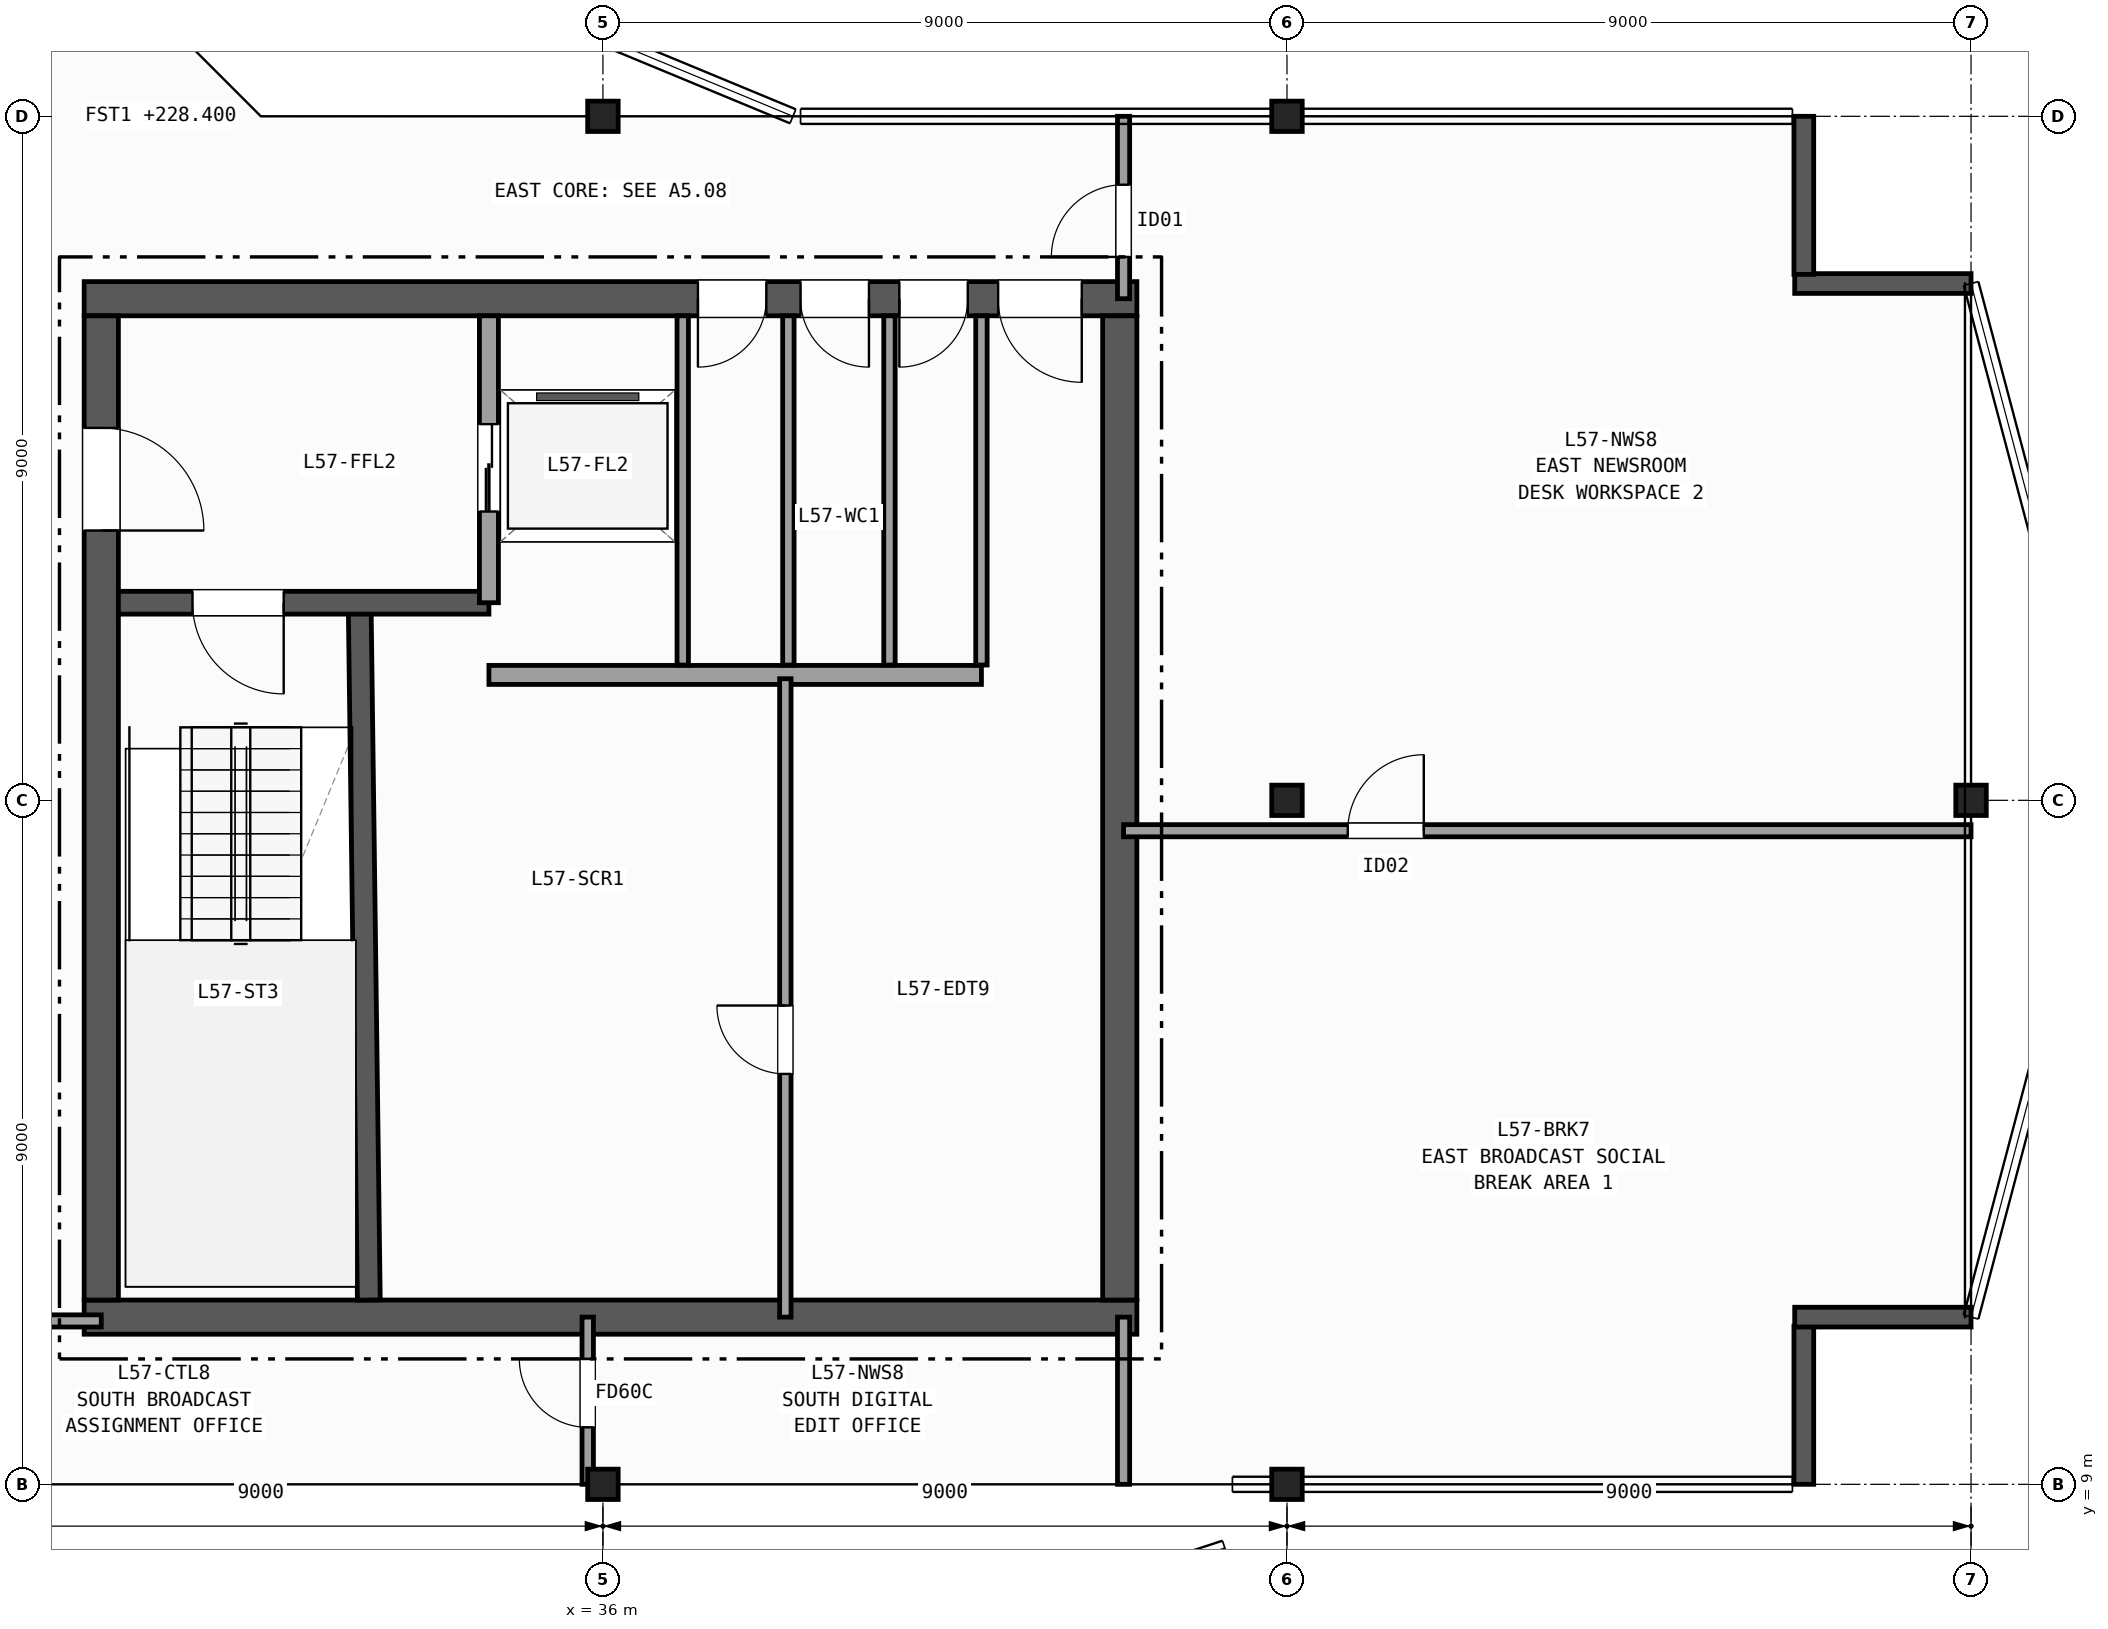
"""IFC4 building model, lengths in metres.
Left out: names, types, materials, properties, quantities, classifications, styles, units other than length and angle.
Written with IfcOpenShell. Run it as: python <this file> out.ifc"""

import sys

from ifc_helpers import new_model, si_unit, direction, frame, frame_2d, origin, origin_2d, place, context, subcontext, project, spatial, rectangle, i_section, extrude, element, fill, save


model = new_model("IFC4")
c1 = context("Model", 3, precision=1e-05, world=origin(), true_north=direction((0.0, 1.0)))
c2 = subcontext(c1, "Body", "Model", "MODEL_VIEW")
j1 = project(units=[si_unit("LENGTHUNIT", "METRE"), si_unit("PLANEANGLEUNIT", "RADIAN")], contexts=[c1])
p1 = place(None, origin())
s1 = spatial("IfcSite", under=j1, at=p1, CompositionType="ELEMENT")
p2 = place(p1, origin())
s2 = spatial("IfcBuilding", under=s1, at=p2, CompositionType="ELEMENT")
p3 = place(p2, frame((0.0, 0.0, 228.4)))
s3 = spatial("IfcBuildingStorey", under=s2, at=p3, CompositionType="ELEMENT", Elevation=228.4)
for number, where, z_axis, x_axis in (
    (1, (36.0, 9.0, 0.0), (0.0, 0.0, 1.0), (1.0, 0.0, 0.0)),
    (2, (36.0, 27.0, 0.0), (0.0, 0.0, 1.0), (1.0, 0.0, 0.0)),
    (3, (45.0, 9.0, 0.0), (0.0, 0.0, 1.0), (1.0, 0.0, 0.0)),
    (4, (45.0, 18.0, 0.0), (0.0, 0.0, 1.0), (1.0, 0.0, 0.0)),
    (5, (45.0, 27.0, 0.0), (0.0, 0.0, 1.0), (1.0, 0.0, 0.0)),
    (6, (54.0, 18.0, 0.0), (0.0, 0.0, 1.0), (1.0, 0.0, 0.0)),
):
    element("IfcColumn", number, at=place(p3, frame(where, z_axis=z_axis, x_axis=x_axis)), inside=s3, PredefinedType="COLUMN", context=c2, shape_type="SweptSolid", body=[
        extrude(i_section(OverallWidth=0.401, OverallDepth=0.399, WebThickness=0.025, FlangeThickness=0.04, FilletRadius=0.015, at=origin_2d()), origin(), (0.0, 0.0, 1.0), 3.7),
    ])
p4 = place(p3, frame((51.8, 9.0, 0.0), z_axis=(0.0, 0.0, 1.0), x_axis=(0.0, 1.0, 0.0)))
e7 = element("IfcWall", 7, at=p4, inside=s3, PredefinedType="SOLIDWALL", context=c2, shape_type="SweptSolid", body=[
    extrude(rectangle(XDim=2.08, YDim=0.26, at=frame_2d((1.04, 0.0))), origin(), (0.0, 0.0, 1.0), 3.42),
])
for number, where, z_axis, x_axis in (
    (8, (51.68, 11.2, 0.0), (0.0, 0.0, 1.0), (1.0, 0.0, 0.0)),
    (9, (54.0, 24.8, 0.0), (0.0, 0.0, 1.0), (-1.0, 0.0, 0.0)),
):
    element("IfcWall", number, at=place(p3, frame(where, z_axis=z_axis, x_axis=x_axis)), inside=s3, PredefinedType="SOLIDWALL", context=c2, shape_type="SweptSolid", body=[
        extrude(rectangle(XDim=2.32, YDim=0.26, at=frame_2d((1.16, 0.0))), origin(), (0.0, 0.0, 1.0), 3.42),
    ])
p5 = place(p3, frame((51.8, 24.92, 0.0), z_axis=(0.0, 0.0, 1.0), x_axis=(0.0, 1.0, 0.0)))
e10 = element("IfcWall", 10, at=p5, inside=s3, PredefinedType="SOLIDWALL", context=c2, shape_type="SweptSolid", body=[
    extrude(rectangle(XDim=2.08, YDim=0.26, at=frame_2d((1.04, 0.0))), origin(), (0.0, 0.0, 1.0), 3.42),
])
p6 = place(p3, frame((29.175, 11.2, 0.0), z_axis=(0.0, 0.0, 1.0), x_axis=(1.0, 0.0, 0.0)))
e11 = element("IfcWall", 11, at=p6, inside=s3, PredefinedType="SHEAR", context=c2, shape_type="SweptSolid", body=[
    extrude(rectangle(XDim=13.85, YDim=0.45, at=frame_2d((6.925, 0.0))), origin(), (0.0, 0.0, 1.0), 3.42),
])
p7 = place(p3, frame((43.025, 24.6, 0.0), z_axis=(0.0, 0.0, 1.0), x_axis=(-1.0, 0.0, 0.0)))
e12 = element("IfcWall", 12, at=p7, inside=s3, PredefinedType="SHEAR", context=c2, shape_type="SweptSolid", body=[
    extrude(rectangle(XDim=13.85, YDim=0.45, at=frame_2d((6.925, 0.0))), origin(), (0.0, 0.0, 1.0), 3.42),
])
p8 = place(p7, frame((0.725, 0.0, 0.0)))
e13 = element("IfcOpeningElement", 13, at=p8, cuts=e12, PredefinedType="OPENING", context=c2, shape_type="SweptSolid", body=[
    extrude(rectangle(XDim=1.1, YDim=2.15, at=frame_2d((0.55, 1.075))), frame((0.0, 0.235, 0.0), z_axis=(0.0, -1.0, 0.0), x_axis=(1.0, 0.0, 0.0)), (0.0, 0.0, 1.0), 0.47),
])
p9 = place(p7, frame((2.225, 0.0, 0.0)))
e14 = element("IfcOpeningElement", 14, at=p9, cuts=e12, PredefinedType="OPENING", context=c2, shape_type="SweptSolid", body=[
    extrude(rectangle(XDim=0.9, YDim=2.1, at=frame_2d((0.45, 1.05))), frame((0.0, 0.235, 0.0), z_axis=(0.0, -1.0, 0.0), x_axis=(1.0, 0.0, 0.0)), (0.0, 0.0, 1.0), 0.47),
])
p10 = place(p7, frame((3.525, 0.0, 0.0)))
e15 = element("IfcOpeningElement", 15, at=p10, cuts=e12, PredefinedType="OPENING", context=c2, shape_type="SweptSolid", body=[
    extrude(rectangle(XDim=0.9, YDim=2.1, at=frame_2d((0.45, 1.05))), frame((0.0, 0.235, 0.0), z_axis=(0.0, -1.0, 0.0), x_axis=(1.0, 0.0, 0.0)), (0.0, 0.0, 1.0), 0.47),
])
p11 = place(p7, frame((4.875, 0.0, 0.0)))
e16 = element("IfcOpeningElement", 16, at=p11, cuts=e12, PredefinedType="OPENING", context=c2, shape_type="SweptSolid", body=[
    extrude(rectangle(XDim=0.9, YDim=2.1, at=frame_2d((0.45, 1.05))), frame((0.0, 0.235, 0.0), z_axis=(0.0, -1.0, 0.0), x_axis=(1.0, 0.0, 0.0)), (0.0, 0.0, 1.0), 0.47),
])
p12 = place(p3, frame((29.4, 24.375, 0.0), z_axis=(0.0, 0.0, 1.0), x_axis=(0.0, -1.0, 0.0)))
e17 = element("IfcWall", 17, at=p12, inside=s3, PredefinedType="SHEAR", context=c2, shape_type="SweptSolid", body=[
    extrude(rectangle(XDim=12.95, YDim=0.45, at=frame_2d((6.475, 0.0))), origin(), (0.0, 0.0, 1.0), 3.42),
])
p13 = place(p12, frame((1.475, 0.0, 0.0)))
e18 = element("IfcOpeningElement", 18, at=p13, cuts=e17, PredefinedType="OPENING", context=c2, shape_type="SweptSolid", body=[
    extrude(rectangle(XDim=1.35, YDim=2.15, at=frame_2d((0.675, 1.075))), frame((0.0, 0.235, 0.0), z_axis=(0.0, -1.0, 0.0), x_axis=(1.0, 0.0, 0.0)), (0.0, 0.0, 1.0), 0.47),
])
p14 = place(p3, frame((42.8, 11.425, 0.0), z_axis=(0.0, 0.0, 1.0), x_axis=(0.0, 1.0, 0.0)))
e19 = element("IfcWall", 19, at=p14, inside=s3, PredefinedType="SHEAR", context=c2, shape_type="SweptSolid", body=[
    extrude(rectangle(XDim=12.95, YDim=0.45, at=frame_2d((6.475, 0.0))), origin(), (0.0, 0.0, 1.0), 3.42),
])
p15 = place(p3, frame((32.92, 11.425, 0.0), z_axis=(0.0, 0.0, 1.0), x_axis=(-0.013135638869, 0.999913723774, 0.0)))
e20 = element("IfcWall", 20, at=p15, inside=s3, PredefinedType="SHEAR", context=c2, shape_type="SweptSolid", body=[
    extrude(rectangle(XDim=9.126, YDim=0.3, at=frame_2d((4.563, 0.0))), origin(), (0.0, 0.0, 1.0), 3.42),
])
p16 = place(p3, frame((34.5, 20.6, 0.0), z_axis=(0.0, 0.0, 1.0), x_axis=(-1.0, 0.0, 0.0)))
e21 = element("IfcWall", 21, at=p16, inside=s3, PredefinedType="SHEAR", context=c2, shape_type="SweptSolid", body=[
    extrude(rectangle(XDim=4.875, YDim=0.3, at=frame_2d((2.438, 0.0))), origin(), (0.0, 0.0, 1.0), 3.42),
])
p17 = place(p16, frame((2.7, 0.0, 0.0)))
e22 = element("IfcOpeningElement", 22, at=p17, cuts=e21, PredefinedType="OPENING", context=c2, shape_type="SweptSolid", body=[
    extrude(rectangle(XDim=1.2, YDim=2.15, at=frame_2d((0.6, 1.075))), frame((0.0, 0.16, 0.0), z_axis=(0.0, -1.0, 0.0), x_axis=(1.0, 0.0, 0.0)), (0.0, 0.0, 1.0), 0.32),
])
p18 = place(p3, frame((34.5, 20.6, 0.0), z_axis=(0.0, 0.0, 1.0), x_axis=(0.0, 1.0, 0.0)))
e23 = element("IfcWall", 23, at=p18, inside=s3, PredefinedType="PARTITIONING", context=c2, shape_type="SweptSolid", body=[
    extrude(rectangle(XDim=3.775, YDim=0.25, at=frame_2d((1.887, 0.0))), origin(), (0.0, 0.0, 1.0), 3.42),
])
p19 = place(p18, frame((1.2, 0.0, 0.0)))
e24 = element("IfcOpeningElement", 24, at=p19, cuts=e23, PredefinedType="OPENING", context=c2, shape_type="SweptSolid", body=[
    extrude(rectangle(XDim=1.15, YDim=2.15, at=frame_2d((0.575, 1.075))), frame((0.0, 0.135, 0.0), z_axis=(0.0, -1.0, 0.0), x_axis=(1.0, 0.0, 0.0)), (0.0, 0.0, 1.0), 0.27),
])
p20 = place(p3, frame((34.5, 19.65, 0.0), z_axis=(0.0, 0.0, 1.0), x_axis=(1.0, 0.0, 0.0)))
e25 = element("IfcWall", 25, at=p20, inside=s3, PredefinedType="PARTITIONING", context=c2, shape_type="SweptSolid", body=[
    extrude(rectangle(XDim=6.48, YDim=0.25, at=frame_2d((3.24, 0.0))), origin(), (0.0, 0.0, 1.0), 3.42),
])
p21 = place(p3, frame((38.4, 11.2, 0.0), z_axis=(0.0, 0.0, 1.0), x_axis=(0.0, 1.0, 0.0)))
e26 = element("IfcWall", 26, at=p21, inside=s3, PredefinedType="PARTITIONING", context=c2, shape_type="SweptSolid", body=[
    extrude(rectangle(XDim=8.4, YDim=0.15, at=frame_2d((4.2, 0.0))), origin(), (0.0, 0.0, 1.0), 3.42),
])
p22 = place(p21, frame((3.2, 0.0, 0.0)))
e27 = element("IfcOpeningElement", 27, at=p22, cuts=e26, PredefinedType="OPENING", context=c2, shape_type="SweptSolid", body=[
    extrude(rectangle(XDim=0.9, YDim=2.1, at=frame_2d((0.45, 1.05))), frame((0.0, 0.085, 0.0), z_axis=(0.0, -1.0, 0.0), x_axis=(1.0, 0.0, 0.0)), (0.0, 0.0, 1.0), 0.17),
])
for number, where, z_axis, x_axis in (
    (28, (37.05, 19.78, 0.0), (0.0, 0.0, 1.0), (0.0, 1.0, 0.0)),
    (29, (38.44, 19.78, 0.0), (0.0, 0.0, 1.0), (0.0, 1.0, 0.0)),
    (30, (39.77, 19.78, 0.0), (0.0, 0.0, 1.0), (0.0, 1.0, 0.0)),
    (31, (40.98, 19.78, 0.0), (0.0, 0.0, 1.0), (0.0, 1.0, 0.0)),
):
    element("IfcWall", number, at=place(p3, frame(where, z_axis=z_axis, x_axis=x_axis)), inside=s3, PredefinedType="PARTITIONING", context=c2, shape_type="SweptSolid", body=[
        extrude(rectangle(XDim=4.595, YDim=0.15, at=frame_2d((2.297, 0.0))), origin(), (0.0, 0.0, 1.0), 3.42),
    ])
p23 = place(p3, frame((24.65, 11.15, 0.0), z_axis=(0.0, 0.0, 1.0), x_axis=(1.0, 0.0, 0.0)))
e32 = element("IfcWall", 32, at=p23, inside=s3, PredefinedType="PARTITIONING", context=c2, shape_type="SweptSolid", body=[
    extrude(rectangle(XDim=4.75, YDim=0.16, at=frame_2d((2.375, 0.0))), origin(), (0.0, 0.0, 1.0), 2.792),
])
p24 = place(p23, frame((1.2, 0.0, 0.0)))
e33 = element("IfcOpeningElement", 33, at=p24, cuts=e32, PredefinedType="OPENING", context=c2, shape_type="SweptSolid", body=[
    extrude(rectangle(XDim=1.2, YDim=2.15, at=frame_2d((0.6, 1.075))), frame((0.0, 0.09, 0.0), z_axis=(0.0, -1.0, 0.0), x_axis=(1.0, 0.0, 0.0)), (0.0, 0.0, 1.0), 0.18),
])
p25 = place(p3, frame((35.8, 9.0, 0.0), z_axis=(0.0, 0.0, 1.0), x_axis=(0.0, 1.0, 0.0)))
e34 = element("IfcWall", 34, at=p25, inside=s3, PredefinedType="PARTITIONING", context=c2, shape_type="SweptSolid", body=[
    extrude(rectangle(XDim=2.2, YDim=0.15, at=frame_2d((1.1, 0.0))), origin(), (0.0, 0.0, 1.0), 2.707),
])
p26 = place(p25, frame((0.75, 0.0, 0.0)))
e35 = element("IfcOpeningElement", 35, at=p26, cuts=e34, PredefinedType="OPENING", context=c2, shape_type="SweptSolid", body=[
    extrude(rectangle(XDim=0.9, YDim=2.1, at=frame_2d((0.45, 1.05))), frame((0.0, 0.085, 0.0), z_axis=(0.0, -1.0, 0.0), x_axis=(1.0, 0.0, 0.0)), (0.0, 0.0, 1.0), 0.17),
])
p27 = place(p3, frame((42.85, 9.0, 0.0), z_axis=(0.0, 0.0, 1.0), x_axis=(0.0, 1.0, 0.0)))
e36 = element("IfcWall", 36, at=p27, inside=s3, PredefinedType="PARTITIONING", context=c2, shape_type="SweptSolid", body=[
    extrude(rectangle(XDim=2.2, YDim=0.16, at=frame_2d((1.1, 0.0))), origin(), (0.0, 0.0, 1.0), 2.707),
])
p28 = place(p3, frame((42.85, 24.6, 0.0), z_axis=(0.0, 0.0, 1.0), x_axis=(0.0, 1.0, 0.0)))
e37 = element("IfcWall", 37, at=p28, inside=s3, PredefinedType="PARTITIONING", context=c2, shape_type="SweptSolid", body=[
    extrude(rectangle(XDim=2.4, YDim=0.16, at=frame_2d((1.2, 0.0))), origin(), (0.0, 0.0, 1.0), 2.707),
])
p29 = place(p28, frame((0.55, 0.0, 0.0)))
e38 = element("IfcOpeningElement", 38, at=p29, cuts=e37, PredefinedType="OPENING", context=c2, shape_type="SweptSolid", body=[
    extrude(rectangle(XDim=0.95, YDim=2.1, at=frame_2d((0.475, 1.05))), frame((0.0, 0.09, 0.0), z_axis=(0.0, -1.0, 0.0), x_axis=(1.0, 0.0, 0.0)), (0.0, 0.0, 1.0), 0.18),
])
p30 = place(p3, frame((42.85, 17.6, 0.0), z_axis=(0.0, 0.0, 1.0), x_axis=(1.0, 0.0, 0.0)))
e39 = element("IfcWall", 39, at=p30, inside=s3, PredefinedType="PARTITIONING", context=c2, shape_type="SweptSolid", body=[
    extrude(rectangle(XDim=11.15, YDim=0.16, at=frame_2d((5.575, 0.0))), origin(), (0.0, 0.0, 1.0), 3.42),
])
p31 = place(p30, frame((2.95, 0.0, 0.0)))
e40 = element("IfcOpeningElement", 40, at=p31, cuts=e39, PredefinedType="OPENING", context=c2, shape_type="SweptSolid", body=[
    extrude(rectangle(XDim=1.0, YDim=2.1, at=frame_2d((0.5, 1.05))), frame((0.0, 0.09, 0.0), z_axis=(0.0, -1.0, 0.0), x_axis=(1.0, 0.0, 0.0)), (0.0, 0.0, 1.0), 0.18),
])
p32 = place(p17, origin())
e41 = element("IfcDoor", 41, at=p32, inside=s3, OperationType="SINGLE_SWING_LEFT", PredefinedType="DOOR", context=c2, shape_type="SweptSolid", body=[
    extrude(rectangle(XDim=1.2, YDim=2.15, at=frame_2d((0.6, 1.075))), frame((0.0, 0.025, 0.0), z_axis=(0.0, -1.0, 0.0), x_axis=(1.0, 0.0, 0.0)), (0.0, 0.0, 1.0), 0.05),
])
fill(e22, e41)
p33 = place(p13, origin())
e42 = element("IfcDoor", 42, at=p33, inside=s3, OperationType="SINGLE_SWING_RIGHT", PredefinedType="DOOR", context=c2, shape_type="SweptSolid", body=[
    extrude(rectangle(XDim=1.35, YDim=2.15, at=frame_2d((0.675, 1.075))), frame((0.0, 0.025, 0.0), z_axis=(0.0, -1.0, 0.0), x_axis=(1.0, 0.0, 0.0)), (0.0, 0.0, 1.0), 0.05),
])
fill(e18, e42)
p34 = place(p8, origin())
e43 = element("IfcDoor", 43, at=p34, inside=s3, OperationType="SINGLE_SWING_LEFT", PredefinedType="DOOR", context=c2, shape_type="SweptSolid", body=[
    extrude(rectangle(XDim=1.1, YDim=2.15, at=frame_2d((0.55, 1.075))), frame((0.0, 0.025, 0.0), z_axis=(0.0, -1.0, 0.0), x_axis=(1.0, 0.0, 0.0)), (0.0, 0.0, 1.0), 0.05),
])
fill(e13, e43)
p35 = place(p9, origin())
e44 = element("IfcDoor", 44, at=p35, inside=s3, OperationType="SINGLE_SWING_RIGHT", PredefinedType="DOOR", context=c2, shape_type="SweptSolid", body=[
    extrude(rectangle(XDim=0.9, YDim=2.1, at=frame_2d((0.45, 1.05))), frame((0.0, 0.025, 0.0), z_axis=(0.0, -1.0, 0.0), x_axis=(1.0, 0.0, 0.0)), (0.0, 0.0, 1.0), 0.05),
])
fill(e14, e44)
p36 = place(p10, origin())
e45 = element("IfcDoor", 45, at=p36, inside=s3, OperationType="SINGLE_SWING_LEFT", PredefinedType="DOOR", context=c2, shape_type="SweptSolid", body=[
    extrude(rectangle(XDim=0.9, YDim=2.1, at=frame_2d((0.45, 1.05))), frame((0.0, 0.025, 0.0), z_axis=(0.0, -1.0, 0.0), x_axis=(1.0, 0.0, 0.0)), (0.0, 0.0, 1.0), 0.05),
])
fill(e15, e45)
p37 = place(p11, origin())
e46 = element("IfcDoor", 46, at=p37, inside=s3, OperationType="SINGLE_SWING_RIGHT", PredefinedType="DOOR", context=c2, shape_type="SweptSolid", body=[
    extrude(rectangle(XDim=0.9, YDim=2.1, at=frame_2d((0.45, 1.05))), frame((0.0, 0.025, 0.0), z_axis=(0.0, -1.0, 0.0), x_axis=(1.0, 0.0, 0.0)), (0.0, 0.0, 1.0), 0.05),
])
fill(e16, e46)
p38 = place(p19, origin())
e47 = element("IfcDoor", 47, at=p38, inside=s3, OperationType="DOUBLE_DOOR_SLIDING", PredefinedType="DOOR", context=c2, shape_type="SweptSolid", body=[
    extrude(rectangle(XDim=1.15, YDim=2.15, at=frame_2d((0.575, 1.075))), frame((0.0, 0.025, 0.0), z_axis=(0.0, -1.0, 0.0), x_axis=(1.0, 0.0, 0.0)), (0.0, 0.0, 1.0), 0.05),
])
fill(e24, e47)
p39 = place(p22, origin())
e48 = element("IfcDoor", 48, at=p39, inside=s3, OperationType="SINGLE_SWING_RIGHT", PredefinedType="DOOR", context=c2, shape_type="SweptSolid", body=[
    extrude(rectangle(XDim=0.9, YDim=2.1, at=frame_2d((0.45, 1.05))), frame((0.0, 0.025, 0.0), z_axis=(0.0, -1.0, 0.0), x_axis=(1.0, 0.0, 0.0)), (0.0, 0.0, 1.0), 0.05),
])
fill(e27, e48)
p40 = place(p26, origin())
e49 = element("IfcDoor", 49, at=p40, inside=s3, OperationType="SINGLE_SWING_RIGHT", PredefinedType="DOOR", context=c2, shape_type="SweptSolid", body=[
    extrude(rectangle(XDim=0.9, YDim=2.1, at=frame_2d((0.45, 1.05))), frame((0.0, 0.025, 0.0), z_axis=(0.0, -1.0, 0.0), x_axis=(1.0, 0.0, 0.0)), (0.0, 0.0, 1.0), 0.05),
])
fill(e35, e49)
p41 = place(p29, origin())
e50 = element("IfcDoor", 50, at=p41, inside=s3, OperationType="SINGLE_SWING_LEFT", PredefinedType="DOOR", context=c2, shape_type="SweptSolid", body=[
    extrude(rectangle(XDim=0.95, YDim=2.1, at=frame_2d((0.475, 1.05))), frame((0.0, 0.025, 0.0), z_axis=(0.0, -1.0, 0.0), x_axis=(1.0, 0.0, 0.0)), (0.0, 0.0, 1.0), 0.05),
])
fill(e38, e50)
p42 = place(p31, origin())
e51 = element("IfcDoor", 51, at=p42, inside=s3, OperationType="SINGLE_SWING_RIGHT", PredefinedType="DOOR", context=c2, shape_type="SweptSolid", body=[
    extrude(rectangle(XDim=1.0, YDim=2.1, at=frame_2d((0.5, 1.05))), frame((0.0, 0.025, 0.0), z_axis=(0.0, -1.0, 0.0), x_axis=(1.0, 0.0, 0.0)), (0.0, 0.0, 1.0), 0.05),
])
fill(e40, e51)
save(model, sys.argv[1])
